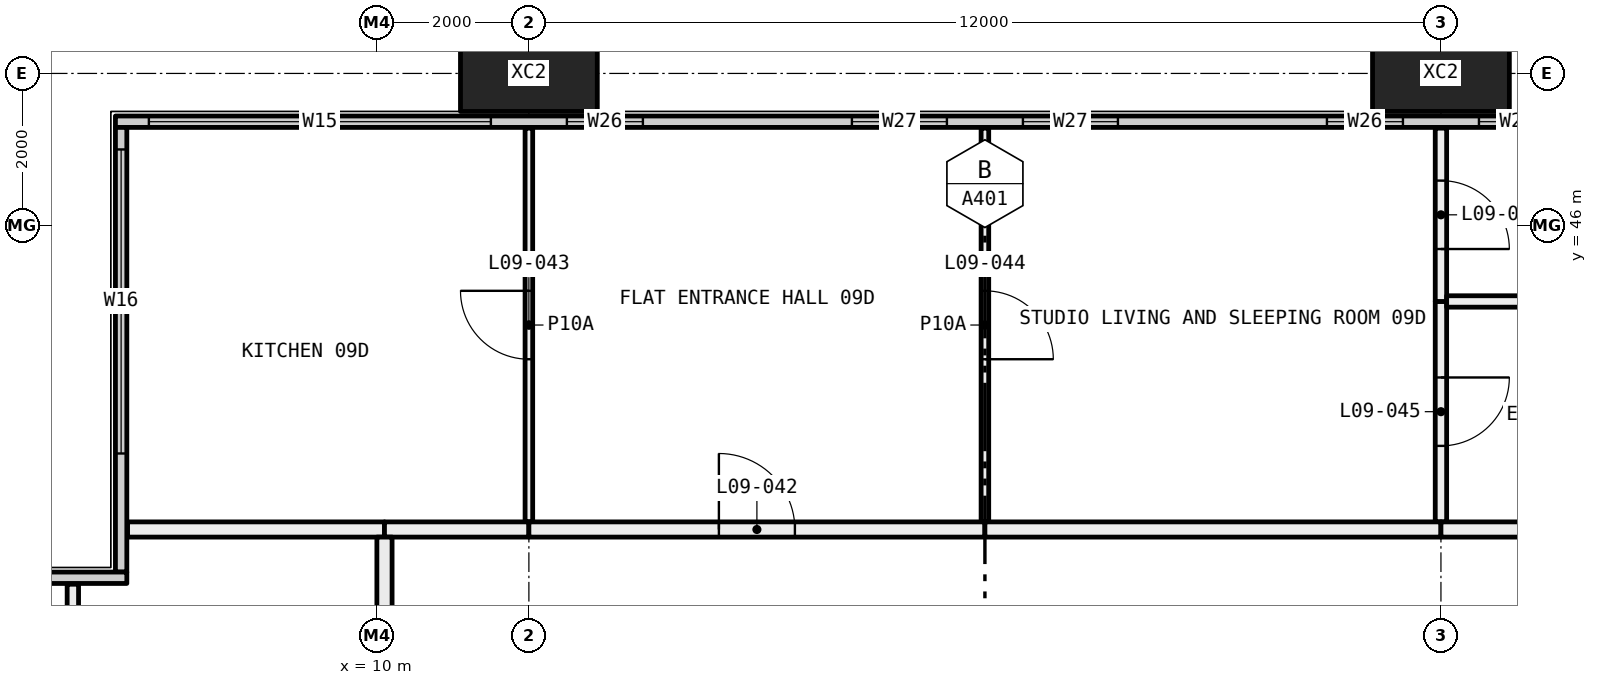
"""IFC4 building model, lengths in metres.
Left out: names, types, materials, properties, quantities, classifications, styles, units other than length and angle.
Written with IfcOpenShell. Run it as: python <this file> out.ifc"""

import sys

from ifc_helpers import new_model, si_unit, direction, frame, frame_2d, origin, origin_2d, place, context, subcontext, project, spatial, rectangle, hollow_rectangle, extrude, element, fill, save


model = new_model("IFC4")
c1 = context("Model", 3, precision=1e-05, world=origin(), true_north=direction((0.0, 1.0)))
c2 = subcontext(c1, "Body", "Model", "MODEL_VIEW")
j1 = project(units=[si_unit("LENGTHUNIT", "METRE"), si_unit("PLANEANGLEUNIT", "RADIAN")], contexts=[c1])
p1 = place(None, origin())
s1 = spatial("IfcSite", under=j1, at=p1, CompositionType="ELEMENT")
p2 = place(p1, origin())
s2 = spatial("IfcBuilding", under=s1, at=p2, CompositionType="ELEMENT")
p3 = place(p2, frame((0.0, 0.0, 43.8)))
s3 = spatial("IfcBuildingStorey", under=s2, at=p3, CompositionType="ELEMENT", Elevation=43.8)
for number, where, z_axis, x_axis in (
    (1, (12.0, 48.0, -0.4), (0.0, 0.0, 1.0), (1.0, 0.0, 0.0)),
    (2, (24.0, 48.0, -0.4), (0.0, 0.0, 1.0), (1.0, 0.0, 0.0)),
):
    element("IfcColumn", number, at=place(p3, frame(where, z_axis=z_axis, x_axis=x_axis)), inside=s3, PredefinedType="COLUMN", context=c2, shape_type="SweptSolid", body=[
        extrude(hollow_rectangle(XDim=1.8, YDim=1.0, WallThickness=0.07, at=origin_2d()), origin(), (0.0, 0.0, 1.0), 3.45),
    ])
p4 = place(p3, frame((6.56, 47.365, 0.0), z_axis=(0.0, 0.0, 1.0), x_axis=(1.0, 0.0, 0.0)))
e3 = element("IfcWall", 3, at=p4, inside=s3, PredefinedType="ELEMENTEDWALL", context=c2, shape_type="SweptSolid", body=[
    extrude(rectangle(XDim=58.88, YDim=0.15, at=frame_2d((29.44, 0.0))), origin(), (0.0, 0.0, 1.0), 3.05),
])
p5 = place(p4, frame((0.44, 0.0, 0.45)))
e4 = element("IfcOpeningElement", 4, at=p5, cuts=e3, PredefinedType="OPENING", context=c2, shape_type="SweptSolid", body=[
    extrude(rectangle(XDim=4.5, YDim=2.55, at=frame_2d((2.25, 1.275))), frame((0.0, 0.085, 0.0), z_axis=(0.0, -1.0, 0.0), x_axis=(1.0, 0.0, 0.0)), (0.0, 0.0, 1.0), 0.17),
])
p6 = place(p4, frame((5.94, 0.0, 0.45)))
e5 = element("IfcOpeningElement", 5, at=p6, cuts=e3, PredefinedType="OPENING", context=c2, shape_type="SweptSolid", body=[
    extrude(rectangle(XDim=1.0, YDim=2.55, at=frame_2d((0.5, 1.275))), frame((0.0, 0.085, 0.0), z_axis=(0.0, -1.0, 0.0), x_axis=(1.0, 0.0, 0.0)), (0.0, 0.0, 1.0), 0.17),
])
p7 = place(p4, frame((9.69, 0.0, 0.45)))
e6 = element("IfcOpeningElement", 6, at=p7, cuts=e3, PredefinedType="OPENING", context=c2, shape_type="SweptSolid", body=[
    extrude(rectangle(XDim=1.25, YDim=2.55, at=frame_2d((0.625, 1.275))), frame((0.0, 0.085, 0.0), z_axis=(0.0, -1.0, 0.0), x_axis=(1.0, 0.0, 0.0)), (0.0, 0.0, 1.0), 0.17),
])
p8 = place(p4, frame((11.94, 0.0, 0.45)))
e7 = element("IfcOpeningElement", 7, at=p8, cuts=e3, PredefinedType="OPENING", context=c2, shape_type="SweptSolid", body=[
    extrude(rectangle(XDim=1.25, YDim=2.55, at=frame_2d((0.625, 1.275))), frame((0.0, 0.085, 0.0), z_axis=(0.0, -1.0, 0.0), x_axis=(1.0, 0.0, 0.0)), (0.0, 0.0, 1.0), 0.17),
])
p9 = place(p4, frame((15.94, 0.0, 0.45)))
e8 = element("IfcOpeningElement", 8, at=p9, cuts=e3, PredefinedType="OPENING", context=c2, shape_type="SweptSolid", body=[
    extrude(rectangle(XDim=1.0, YDim=2.55, at=frame_2d((0.5, 1.275))), frame((0.0, 0.085, 0.0), z_axis=(0.0, -1.0, 0.0), x_axis=(1.0, 0.0, 0.0)), (0.0, 0.0, 1.0), 0.17),
])
p10 = place(p4, frame((17.94, 0.0, 0.45)))
e9 = element("IfcOpeningElement", 9, at=p10, cuts=e3, PredefinedType="OPENING", context=c2, shape_type="SweptSolid", body=[
    extrude(rectangle(XDim=1.0, YDim=2.55, at=frame_2d((0.5, 1.275))), frame((0.0, 0.085, 0.0), z_axis=(0.0, -1.0, 0.0), x_axis=(1.0, 0.0, 0.0)), (0.0, 0.0, 1.0), 0.17),
])
p11 = place(p4, frame((21.69, 0.0, 0.45)))
e10 = element("IfcOpeningElement", 10, at=p11, cuts=e3, PredefinedType="OPENING", context=c2, shape_type="SweptSolid", body=[
    extrude(rectangle(XDim=1.25, YDim=2.55, at=frame_2d((0.625, 1.275))), frame((0.0, 0.085, 0.0), z_axis=(0.0, -1.0, 0.0), x_axis=(1.0, 0.0, 0.0)), (0.0, 0.0, 1.0), 0.17),
])
p12 = place(p4, frame((23.94, 0.0, 0.45)))
e11 = element("IfcOpeningElement", 11, at=p12, cuts=e3, PredefinedType="OPENING", context=c2, shape_type="SweptSolid", body=[
    extrude(rectangle(XDim=1.25, YDim=2.55, at=frame_2d((0.625, 1.275))), frame((0.0, 0.085, 0.0), z_axis=(0.0, -1.0, 0.0), x_axis=(1.0, 0.0, 0.0)), (0.0, 0.0, 1.0), 0.17),
])
p13 = place(p4, frame((27.94, 0.0, 0.45)))
e12 = element("IfcOpeningElement", 12, at=p13, cuts=e3, PredefinedType="OPENING", context=c2, shape_type="SweptSolid", body=[
    extrude(rectangle(XDim=1.0, YDim=2.55, at=frame_2d((0.5, 1.275))), frame((0.0, 0.085, 0.0), z_axis=(0.0, -1.0, 0.0), x_axis=(1.0, 0.0, 0.0)), (0.0, 0.0, 1.0), 0.17),
])
p14 = place(p4, frame((29.94, 0.0, 0.45)))
e13 = element("IfcOpeningElement", 13, at=p14, cuts=e3, PredefinedType="OPENING", context=c2, shape_type="SweptSolid", body=[
    extrude(rectangle(XDim=1.0, YDim=2.55, at=frame_2d((0.5, 1.275))), frame((0.0, 0.085, 0.0), z_axis=(0.0, -1.0, 0.0), x_axis=(1.0, 0.0, 0.0)), (0.0, 0.0, 1.0), 0.17),
])
p15 = place(p4, frame((33.69, 0.0, 0.45)))
e14 = element("IfcOpeningElement", 14, at=p15, cuts=e3, PredefinedType="OPENING", context=c2, shape_type="SweptSolid", body=[
    extrude(rectangle(XDim=1.25, YDim=2.55, at=frame_2d((0.625, 1.275))), frame((0.0, 0.085, 0.0), z_axis=(0.0, -1.0, 0.0), x_axis=(1.0, 0.0, 0.0)), (0.0, 0.0, 1.0), 0.17),
])
p16 = place(p4, frame((35.94, 0.0, 0.45)))
e15 = element("IfcOpeningElement", 15, at=p16, cuts=e3, PredefinedType="OPENING", context=c2, shape_type="SweptSolid", body=[
    extrude(rectangle(XDim=1.25, YDim=2.55, at=frame_2d((0.625, 1.275))), frame((0.0, 0.085, 0.0), z_axis=(0.0, -1.0, 0.0), x_axis=(1.0, 0.0, 0.0)), (0.0, 0.0, 1.0), 0.17),
])
p17 = place(p4, frame((39.94, 0.0, 0.45)))
e16 = element("IfcOpeningElement", 16, at=p17, cuts=e3, PredefinedType="OPENING", context=c2, shape_type="SweptSolid", body=[
    extrude(rectangle(XDim=1.0, YDim=2.55, at=frame_2d((0.5, 1.275))), frame((0.0, 0.085, 0.0), z_axis=(0.0, -1.0, 0.0), x_axis=(1.0, 0.0, 0.0)), (0.0, 0.0, 1.0), 0.17),
])
p18 = place(p4, frame((41.94, 0.0, 0.45)))
e17 = element("IfcOpeningElement", 17, at=p18, cuts=e3, PredefinedType="OPENING", context=c2, shape_type="SweptSolid", body=[
    extrude(rectangle(XDim=1.0, YDim=2.55, at=frame_2d((0.5, 1.275))), frame((0.0, 0.085, 0.0), z_axis=(0.0, -1.0, 0.0), x_axis=(1.0, 0.0, 0.0)), (0.0, 0.0, 1.0), 0.17),
])
p19 = place(p4, frame((45.69, 0.0, 0.45)))
e18 = element("IfcOpeningElement", 18, at=p19, cuts=e3, PredefinedType="OPENING", context=c2, shape_type="SweptSolid", body=[
    extrude(rectangle(XDim=1.25, YDim=2.55, at=frame_2d((0.625, 1.275))), frame((0.0, 0.085, 0.0), z_axis=(0.0, -1.0, 0.0), x_axis=(1.0, 0.0, 0.0)), (0.0, 0.0, 1.0), 0.17),
])
p20 = place(p4, frame((47.94, 0.0, 0.45)))
e19 = element("IfcOpeningElement", 19, at=p20, cuts=e3, PredefinedType="OPENING", context=c2, shape_type="SweptSolid", body=[
    extrude(rectangle(XDim=1.25, YDim=2.55, at=frame_2d((0.625, 1.275))), frame((0.0, 0.085, 0.0), z_axis=(0.0, -1.0, 0.0), x_axis=(1.0, 0.0, 0.0)), (0.0, 0.0, 1.0), 0.17),
])
p21 = place(p4, frame((51.94, 0.0, 0.45)))
e20 = element("IfcOpeningElement", 20, at=p21, cuts=e3, PredefinedType="OPENING", context=c2, shape_type="SweptSolid", body=[
    extrude(rectangle(XDim=1.0, YDim=2.55, at=frame_2d((0.5, 1.275))), frame((0.0, 0.085, 0.0), z_axis=(0.0, -1.0, 0.0), x_axis=(1.0, 0.0, 0.0)), (0.0, 0.0, 1.0), 0.17),
])
p22 = place(p4, frame((53.94, 0.0, 0.45)))
e21 = element("IfcOpeningElement", 21, at=p22, cuts=e3, PredefinedType="OPENING", context=c2, shape_type="SweptSolid", body=[
    extrude(rectangle(XDim=4.5, YDim=2.55, at=frame_2d((2.25, 1.275))), frame((0.0, 0.085, 0.0), z_axis=(0.0, -1.0, 0.0), x_axis=(1.0, 0.0, 0.0)), (0.0, 0.0, 1.0), 0.17),
])
p23 = place(p3, frame((6.635, 41.44, 0.0), z_axis=(0.0, 0.0, 1.0), x_axis=(0.0, 1.0, 0.0)))
e22 = element("IfcWall", 22, at=p23, inside=s3, PredefinedType="ELEMENTEDWALL", context=c2, shape_type="SweptSolid", body=[
    extrude(rectangle(XDim=5.85, YDim=0.15, at=frame_2d((2.925, 0.0))), origin(), (0.0, 0.0, 1.0), 3.05),
])
p24 = place(p23, frame((1.56, 0.0, 0.45)))
e23 = element("IfcOpeningElement", 23, at=p24, cuts=e22, PredefinedType="OPENING", context=c2, shape_type="SweptSolid", body=[
    extrude(rectangle(XDim=4.0, YDim=2.55, at=frame_2d((2.0, 1.275))), frame((0.0, 0.085, 0.0), z_axis=(0.0, -1.0, 0.0), x_axis=(1.0, 0.0, 0.0)), (0.0, 0.0, 1.0), 0.17),
])
p25 = place(p3, frame((0.56, 41.365, 0.0), z_axis=(0.0, 0.0, 1.0), x_axis=(1.0, 0.0, 0.0)))
e24 = element("IfcWall", 24, at=p25, inside=s3, PredefinedType="ELEMENTEDWALL", context=c2, shape_type="SweptSolid", body=[
    extrude(rectangle(XDim=6.15, YDim=0.15, at=frame_2d((3.075, 0.0))), origin(), (0.0, 0.0, 1.0), 3.05),
])
p26 = place(p25, frame((0.44, 0.0, 0.45)))
e25 = element("IfcOpeningElement", 25, at=p26, cuts=e24, PredefinedType="OPENING", context=c2, shape_type="SweptSolid", body=[
    extrude(rectangle(XDim=4.0, YDim=2.55, at=frame_2d((2.0, 1.275))), frame((0.0, 0.085, 0.0), z_axis=(0.0, -1.0, 0.0), x_axis=(1.0, 0.0, 0.0)), (0.0, 0.0, 1.0), 0.17),
])
p27 = place(p3, frame((12.0, 42.1, 0.0), z_axis=(0.0, 0.0, 1.0), x_axis=(0.0, 1.0, 0.0)))
e26 = element("IfcWall", 26, at=p27, inside=s3, PredefinedType="PARTITIONING", context=c2, shape_type="SweptSolid", body=[
    extrude(rectangle(XDim=5.18, YDim=0.1, at=frame_2d((2.59, 0.0))), origin(), (0.0, 0.0, 1.0), 3.05),
])
p28 = place(p27, frame((2.14, 0.0, 0.0)))
e27 = element("IfcOpeningElement", 27, at=p28, cuts=e26, PredefinedType="OPENING", context=c2, shape_type="SweptSolid", body=[
    extrude(rectangle(XDim=0.9, YDim=2.1, at=frame_2d((0.45, 1.05))), frame((0.0, 0.06, 0.0), z_axis=(0.0, -1.0, 0.0), x_axis=(1.0, 0.0, 0.0)), (0.0, 0.0, 1.0), 0.12),
])
p29 = place(p3, frame((6.72, 42.0, 0.0), z_axis=(0.0, 0.0, 1.0), x_axis=(1.0, 0.0, 0.0)))
e28 = element("IfcWall", 28, at=p29, inside=s3, PredefinedType="PARTITIONING", context=c2, shape_type="SweptSolid", body=[
    extrude(rectangle(XDim=3.38, YDim=0.2, at=frame_2d((1.69, 0.0))), origin(), (0.0, 0.0, 1.0), 3.05),
])
p30 = place(p3, frame((10.1, 42.0, 0.0), z_axis=(0.0, 0.0, 1.0), x_axis=(1.0, 0.0, 0.0)))
e29 = element("IfcWall", 29, at=p30, inside=s3, PredefinedType="PARTITIONING", context=c2, shape_type="SweptSolid", body=[
    extrude(rectangle(XDim=1.9, YDim=0.2, at=frame_2d((0.95, 0.0))), origin(), (0.0, 0.0, 1.0), 3.05),
])
p31 = place(p3, frame((18.0, 42.1, 0.0), z_axis=(0.0, 0.0, 1.0), x_axis=(0.0, 1.0, 0.0)))
e30 = element("IfcWall", 30, at=p31, inside=s3, PredefinedType="PARTITIONING", context=c2, shape_type="SweptSolid", body=[
    extrude(rectangle(XDim=5.18, YDim=0.1, at=frame_2d((2.59, 0.0))), origin(), (0.0, 0.0, 1.0), 3.05),
])
p32 = place(p31, frame((2.14, 0.0, 0.0)))
e31 = element("IfcOpeningElement", 31, at=p32, cuts=e30, PredefinedType="OPENING", context=c2, shape_type="SweptSolid", body=[
    extrude(rectangle(XDim=0.9, YDim=2.1, at=frame_2d((0.45, 1.05))), frame((0.0, 0.06, 0.0), z_axis=(0.0, -1.0, 0.0), x_axis=(1.0, 0.0, 0.0)), (0.0, 0.0, 1.0), 0.12),
])
p33 = place(p3, frame((12.0, 42.0, 0.0), z_axis=(0.0, 0.0, 1.0), x_axis=(1.0, 0.0, 0.0)))
e32 = element("IfcWall", 32, at=p33, inside=s3, PredefinedType="PARTITIONING", context=c2, shape_type="SweptSolid", body=[
    extrude(rectangle(XDim=6.0, YDim=0.2, at=frame_2d((3.0, 0.0))), origin(), (0.0, 0.0, 1.0), 3.05),
])
p34 = place(p33, frame((2.5, 0.0, 0.0)))
e33 = element("IfcOpeningElement", 33, at=p34, cuts=e32, PredefinedType="OPENING", context=c2, shape_type="SweptSolid", body=[
    extrude(rectangle(XDim=1.0, YDim=2.1, at=frame_2d((0.5, 1.05))), frame((0.0, 0.11, 0.0), z_axis=(0.0, -1.0, 0.0), x_axis=(1.0, 0.0, 0.0)), (0.0, 0.0, 1.0), 0.22),
])
p35 = place(p3, frame((24.0, 42.1, 0.0), z_axis=(0.0, 0.0, 1.0), x_axis=(0.0, 1.0, 0.0)))
e34 = element("IfcWall", 34, at=p35, inside=s3, PredefinedType="PARTITIONING", context=c2, shape_type="SweptSolid", body=[
    extrude(rectangle(XDim=2.9, YDim=0.15, at=frame_2d((1.45, 0.0))), origin(), (0.0, 0.0, 1.0), 3.05),
])
p36 = place(p35, frame((1.0, 0.0, 0.0)))
e35 = element("IfcOpeningElement", 35, at=p36, cuts=e34, PredefinedType="OPENING", context=c2, shape_type="SweptSolid", body=[
    extrude(rectangle(XDim=0.9, YDim=2.1, at=frame_2d((0.45, 1.05))), frame((0.0, 0.085, 0.0), z_axis=(0.0, -1.0, 0.0), x_axis=(1.0, 0.0, 0.0)), (0.0, 0.0, 1.0), 0.17),
])
p37 = place(p3, frame((24.0, 45.0, 0.0), z_axis=(0.0, 0.0, 1.0), x_axis=(0.0, 1.0, 0.0)))
e36 = element("IfcWall", 36, at=p37, inside=s3, PredefinedType="PARTITIONING", context=c2, shape_type="SweptSolid", body=[
    extrude(rectangle(XDim=2.28, YDim=0.15, at=frame_2d((1.14, 0.0))), origin(), (0.0, 0.0, 1.0), 3.05),
])
p38 = place(p37, frame((0.69, 0.0, 0.0)))
e37 = element("IfcOpeningElement", 37, at=p38, cuts=e36, PredefinedType="OPENING", context=c2, shape_type="SweptSolid", body=[
    extrude(rectangle(XDim=0.9, YDim=2.1, at=frame_2d((0.45, 1.05))), frame((0.0, 0.085, 0.0), z_axis=(0.0, -1.0, 0.0), x_axis=(1.0, 0.0, 0.0)), (0.0, 0.0, 1.0), 0.17),
])
p39 = place(p3, frame((18.0, 42.0, 0.0), z_axis=(0.0, 0.0, 1.0), x_axis=(1.0, 0.0, 0.0)))
e38 = element("IfcWall", 38, at=p39, inside=s3, PredefinedType="PARTITIONING", context=c2, shape_type="SweptSolid", body=[
    extrude(rectangle(XDim=6.0, YDim=0.2, at=frame_2d((3.0, 0.0))), origin(), (0.0, 0.0, 1.0), 3.05),
])
p40 = place(p3, frame((29.9, 45.0, 0.0), z_axis=(0.0, 0.0, 1.0), x_axis=(-1.0, 0.0, 0.0)))
e39 = element("IfcWall", 39, at=p40, inside=s3, PredefinedType="PARTITIONING", context=c2, shape_type="SweptSolid", body=[
    extrude(rectangle(XDim=5.825, YDim=0.15, at=frame_2d((2.913, 0.0))), origin(), (0.0, 0.0, 1.0), 3.05),
])
p41 = place(p3, frame((24.0, 42.0, 0.0), z_axis=(0.0, 0.0, 1.0), x_axis=(1.0, 0.0, 0.0)))
e40 = element("IfcWall", 40, at=p41, inside=s3, PredefinedType="PARTITIONING", context=c2, shape_type="SweptSolid", body=[
    extrude(rectangle(XDim=1.9, YDim=0.2, at=frame_2d((0.95, 0.0))), origin(), (0.0, 0.0, 1.0), 3.05),
])
p42 = place(p3, frame((6.0, 37.5, 0.0), z_axis=(0.0, 0.0, 1.0), x_axis=(0.0, 1.0, 0.0)))
e41 = element("IfcWall", 41, at=p42, inside=s3, PredefinedType="PARTITIONING", context=c2, shape_type="SweptSolid", body=[
    extrude(rectangle(XDim=3.78, YDim=0.15, at=frame_2d((1.89, 0.0))), origin(), (0.0, 0.0, 1.0), 3.05),
])
p43 = place(p3, frame((10.1, 37.5, 0.0), z_axis=(0.0, 0.0, 1.0), x_axis=(0.0, 1.0, 0.0)))
e42 = element("IfcWall", 42, at=p43, inside=s3, PredefinedType="PARTITIONING", context=c2, shape_type="SweptSolid", body=[
    extrude(rectangle(XDim=4.4, YDim=0.2, at=frame_2d((2.2, 0.0))), origin(), (0.0, 0.0, 1.0), 3.05),
])
p44 = place(p5, origin())
e43 = element("IfcWindow", 43, at=p44, inside=s3, PartitioningType="SINGLE_PANEL", PredefinedType="WINDOW", context=c2, shape_type="SweptSolid", body=[
    extrude(rectangle(XDim=4.5, YDim=2.55, at=frame_2d((2.25, 1.275))), frame((0.0, 0.03, 0.0), z_axis=(0.0, -1.0, 0.0), x_axis=(1.0, 0.0, 0.0)), (0.0, 0.0, 1.0), 0.06),
])
fill(e4, e43)
p45 = place(p6, origin())
e44 = element("IfcWindow", 44, at=p45, inside=s3, PartitioningType="SINGLE_PANEL", PredefinedType="WINDOW", context=c2, shape_type="SweptSolid", body=[
    extrude(rectangle(XDim=1.0, YDim=2.55, at=frame_2d((0.5, 1.275))), frame((0.0, 0.03, 0.0), z_axis=(0.0, -1.0, 0.0), x_axis=(1.0, 0.0, 0.0)), (0.0, 0.0, 1.0), 0.06),
])
fill(e5, e44)
p46 = place(p7, origin())
e45 = element("IfcWindow", 45, at=p46, inside=s3, PartitioningType="SINGLE_PANEL", PredefinedType="WINDOW", context=c2, shape_type="SweptSolid", body=[
    extrude(rectangle(XDim=1.25, YDim=2.55, at=frame_2d((0.625, 1.275))), frame((0.0, 0.03, 0.0), z_axis=(0.0, -1.0, 0.0), x_axis=(1.0, 0.0, 0.0)), (0.0, 0.0, 1.0), 0.06),
])
fill(e6, e45)
p47 = place(p8, origin())
e46 = element("IfcWindow", 46, at=p47, inside=s3, PartitioningType="SINGLE_PANEL", PredefinedType="WINDOW", context=c2, shape_type="SweptSolid", body=[
    extrude(rectangle(XDim=1.25, YDim=2.55, at=frame_2d((0.625, 1.275))), frame((0.0, 0.03, 0.0), z_axis=(0.0, -1.0, 0.0), x_axis=(1.0, 0.0, 0.0)), (0.0, 0.0, 1.0), 0.06),
])
fill(e7, e46)
p48 = place(p9, origin())
e47 = element("IfcWindow", 47, at=p48, inside=s3, PartitioningType="SINGLE_PANEL", PredefinedType="WINDOW", context=c2, shape_type="SweptSolid", body=[
    extrude(rectangle(XDim=1.0, YDim=2.55, at=frame_2d((0.5, 1.275))), frame((0.0, 0.03, 0.0), z_axis=(0.0, -1.0, 0.0), x_axis=(1.0, 0.0, 0.0)), (0.0, 0.0, 1.0), 0.06),
])
fill(e8, e47)
p49 = place(p10, origin())
e48 = element("IfcWindow", 48, at=p49, inside=s3, PartitioningType="SINGLE_PANEL", PredefinedType="WINDOW", context=c2, shape_type="SweptSolid", body=[
    extrude(rectangle(XDim=1.0, YDim=2.55, at=frame_2d((0.5, 1.275))), frame((0.0, 0.03, 0.0), z_axis=(0.0, -1.0, 0.0), x_axis=(1.0, 0.0, 0.0)), (0.0, 0.0, 1.0), 0.06),
])
fill(e9, e48)
p50 = place(p24, origin())
e49 = element("IfcWindow", 49, at=p50, inside=s3, PartitioningType="SINGLE_PANEL", PredefinedType="WINDOW", context=c2, shape_type="SweptSolid", body=[
    extrude(rectangle(XDim=4.0, YDim=2.55, at=frame_2d((2.0, 1.275))), frame((0.0, 0.03, 0.0), z_axis=(0.0, -1.0, 0.0), x_axis=(1.0, 0.0, 0.0)), (0.0, 0.0, 1.0), 0.06),
])
fill(e23, e49)
p51 = place(p34, origin())
e50 = element("IfcDoor", 50, at=p51, inside=s3, OperationType="SINGLE_SWING_RIGHT", PredefinedType="DOOR", context=c2, shape_type="SweptSolid", body=[
    extrude(rectangle(XDim=1.0, YDim=2.1, at=frame_2d((0.5, 1.05))), frame((0.0, 0.025, 0.0), z_axis=(0.0, -1.0, 0.0), x_axis=(1.0, 0.0, 0.0)), (0.0, 0.0, 1.0), 0.05),
])
fill(e33, e50)
p52 = place(p28, origin())
e51 = element("IfcDoor", 51, at=p52, inside=s3, OperationType="SINGLE_SWING_LEFT", PredefinedType="DOOR", context=c2, shape_type="SweptSolid", body=[
    extrude(rectangle(XDim=0.9, YDim=2.1, at=frame_2d((0.45, 1.05))), frame((0.0, 0.025, 0.0), z_axis=(0.0, -1.0, 0.0), x_axis=(1.0, 0.0, 0.0)), (0.0, 0.0, 1.0), 0.05),
])
fill(e27, e51)
p53 = place(p32, frame((0.9, 0.0, 0.0), x_axis=(-1.0, 0.0, 0.0)))
e52 = element("IfcDoor", 52, at=p53, inside=s3, OperationType="SINGLE_SWING_LEFT", PredefinedType="DOOR", context=c2, shape_type="SweptSolid", body=[
    extrude(rectangle(XDim=0.9, YDim=2.1, at=frame_2d((0.45, 1.05))), frame((0.0, 0.025, 0.0), z_axis=(0.0, -1.0, 0.0), x_axis=(1.0, 0.0, 0.0)), (0.0, 0.0, 1.0), 0.05),
])
fill(e31, e52)
p54 = place(p36, frame((0.9, 0.0, 0.0), x_axis=(-1.0, 0.0, 0.0)))
e53 = element("IfcDoor", 53, at=p54, inside=s3, OperationType="SINGLE_SWING_RIGHT", PredefinedType="DOOR", context=c2, shape_type="SweptSolid", body=[
    extrude(rectangle(XDim=0.9, YDim=2.1, at=frame_2d((0.45, 1.05))), frame((0.0, 0.025, 0.0), z_axis=(0.0, -1.0, 0.0), x_axis=(1.0, 0.0, 0.0)), (0.0, 0.0, 1.0), 0.05),
])
fill(e35, e53)
p55 = place(p38, frame((0.9, 0.0, 0.0), x_axis=(-1.0, 0.0, 0.0)))
e54 = element("IfcDoor", 54, at=p55, inside=s3, OperationType="SINGLE_SWING_LEFT", PredefinedType="DOOR", context=c2, shape_type="SweptSolid", body=[
    extrude(rectangle(XDim=0.9, YDim=2.1, at=frame_2d((0.45, 1.05))), frame((0.0, 0.025, 0.0), z_axis=(0.0, -1.0, 0.0), x_axis=(1.0, 0.0, 0.0)), (0.0, 0.0, 1.0), 0.05),
])
fill(e37, e54)
save(model, sys.argv[1])
